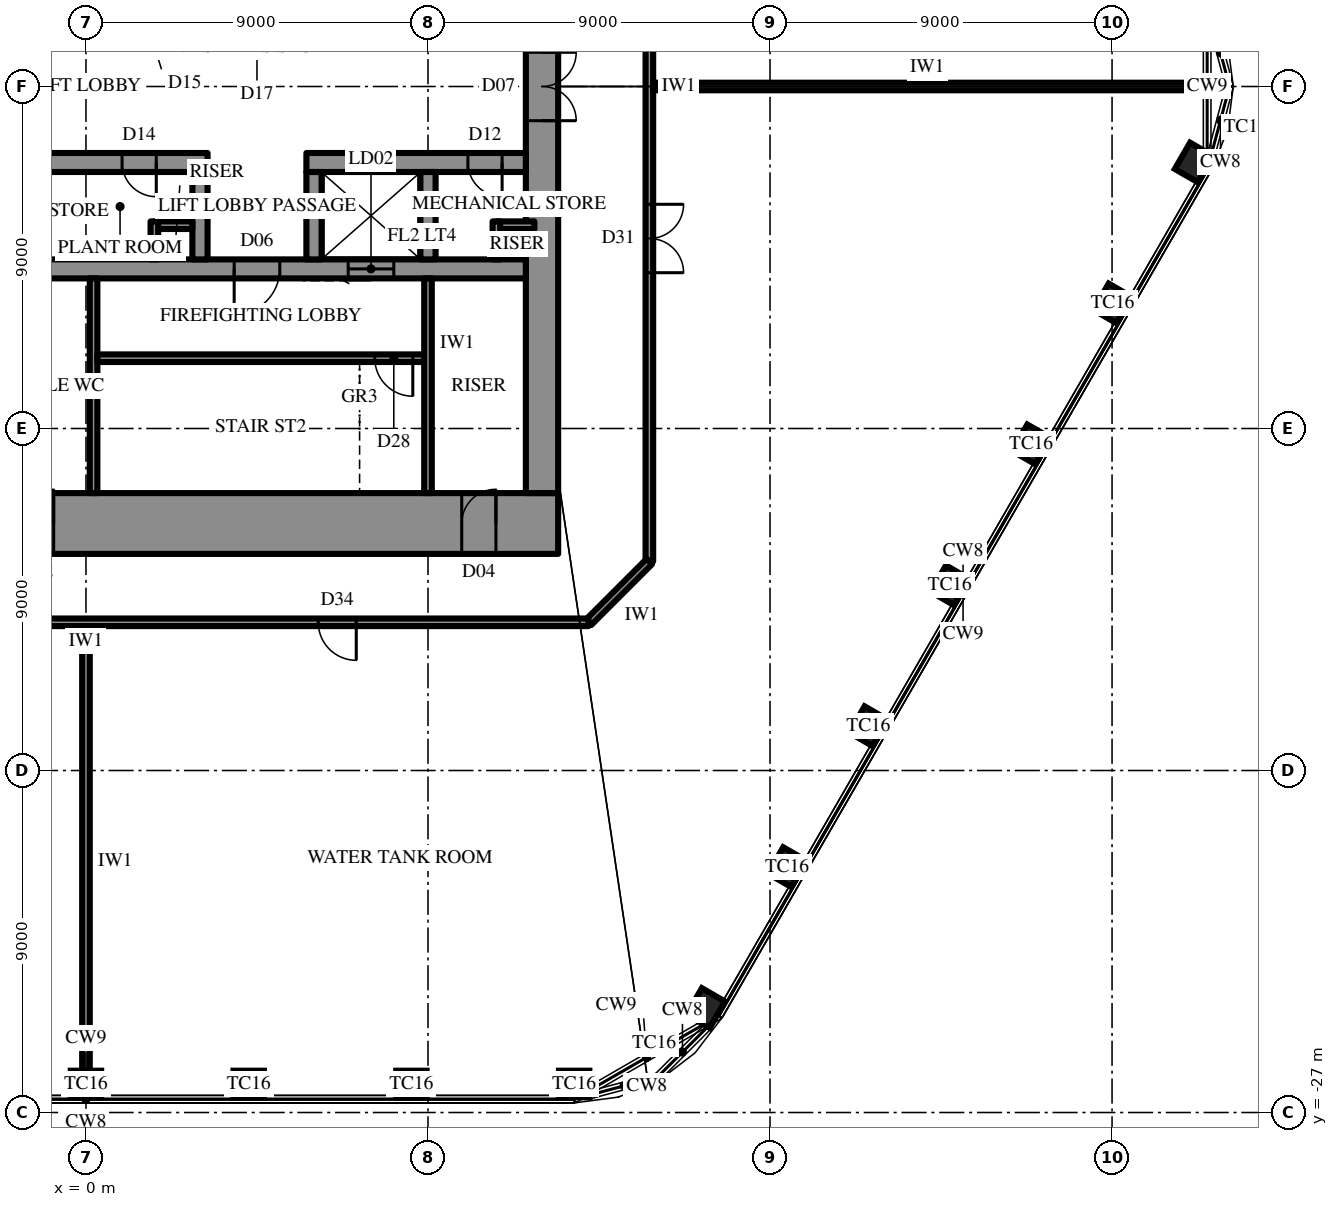
"""IFC4 building model, lengths in metres.
Left out: names, types, materials, properties, quantities, classifications, styles, units other than length and angle.
Written with IfcOpenShell. Run it as: python <this file> out.ifc"""

import sys

from ifc_helpers import new_model, si_unit, direction, frame, frame_2d, origin, origin_2d, place, context, subcontext, project, spatial, rectangle, extrude, element, fill, save


model = new_model("IFC4")
c1 = context("Model", 3, precision=1e-05, world=origin(), true_north=direction((0.0, 1.0)))
c2 = subcontext(c1, "Body", "Model", "MODEL_VIEW")
j1 = project(units=[si_unit("LENGTHUNIT", "METRE"), si_unit("PLANEANGLEUNIT", "RADIAN")], contexts=[c1])
p1 = place(None, origin())
s1 = spatial("IfcSite", under=j1, at=p1, CompositionType="ELEMENT")
p2 = place(p1, origin())
s2 = spatial("IfcBuilding", under=s1, at=p2, CompositionType="ELEMENT")
p3 = place(p2, frame((0.0, 0.0, 402.3)))
s3 = spatial("IfcBuildingStorey", under=s2, at=p3, CompositionType="ELEMENT", Elevation=402.3)
for number, where, z_axis, x_axis in (
    (1, (0.0, -26.25, 0.0), (0.0, 0.0, 1.0), (1.0, 0.0, 0.0)),
    (2, (4.282, -26.25, 0.0), (0.0, 0.0, 1.0), (1.0, 0.0, 0.0)),
    (3, (8.564, -26.25, 0.0), (0.0, 0.0, 1.0), (1.0, 0.0, 0.0)),
    (4, (12.846, -26.25, 0.0), (0.0, 0.0, 1.0), (1.0, 0.0, 0.0)),
    (5, (16.31, -24.25, 0.0), (0.0, 0.0, 1.0), (0.5, 0.866, 0.0)),
    (6, (18.451, -20.542, 0.0), (0.0, 0.0, 1.0), (0.5, 0.866, 0.0)),
    (7, (20.592, -16.833, 0.0), (0.0, 0.0, 1.0), (0.5, 0.866, 0.0)),
    (8, (22.733, -13.125, 0.0), (0.0, 0.0, 1.0), (0.5, 0.866, 0.0)),
    (9, (24.874, -9.417, 0.0), (0.0, 0.0, 1.0), (0.5, 0.866, 0.0)),
    (10, (27.015, -5.708, 0.0), (0.0, 0.0, 1.0), (0.5, 0.866, 0.0)),
    (11, (29.156, -2.0, 0.0), (0.0, 0.0, 1.0), (0.5, 0.866, 0.0)),
):
    element("IfcColumn", number, at=place(p3, frame(where, z_axis=z_axis, x_axis=x_axis)), inside=s3, PredefinedType="COLUMN", context=c2, shape_type="SweptSolid", body=[
        extrude(rectangle(XDim=0.8, YDim=0.7, at=origin_2d()), origin(), (0.0, 0.0, 1.0), 6.0),
    ])
p4 = place(p3, frame((12.425, -11.5, 0.0), z_axis=(0.0, 0.0, 1.0), x_axis=(-1.0, 0.0, 0.0)))
e12 = element("IfcWall", 12, at=p4, inside=s3, PredefinedType="SHEAR", context=c2, shape_type="SweptSolid", body=[
    extrude(rectangle(XDim=24.85, YDim=1.6, at=frame_2d((12.425, 0.0))), origin(), (0.0, 0.0, 1.0), 6.0),
])
p5 = place(p4, frame((13.275, 0.0, 0.0)))
e13 = element("IfcOpeningElement", 13, at=p5, cuts=e12, PredefinedType="OPENING", context=c2, shape_type="SweptSolid", body=[
    extrude(rectangle(XDim=0.9, YDim=2.2, at=frame_2d((0.45, 1.1))), frame((0.0, 0.81, 0.0), z_axis=(0.0, -1.0, 0.0), x_axis=(1.0, 0.0, 0.0)), (0.0, 0.0, 1.0), 1.62),
])
p6 = place(p4, frame((16.275, 0.0, 0.0)))
e14 = element("IfcOpeningElement", 14, at=p6, cuts=e12, PredefinedType="OPENING", context=c2, shape_type="SweptSolid", body=[
    extrude(rectangle(XDim=0.9, YDim=2.2, at=frame_2d((0.45, 1.1))), frame((0.0, 0.81, 0.0), z_axis=(0.0, -1.0, 0.0), x_axis=(1.0, 0.0, 0.0)), (0.0, 0.0, 1.0), 1.62),
])
p7 = place(p4, frame((19.325, 0.0, 0.0)))
e15 = element("IfcOpeningElement", 15, at=p7, cuts=e12, PredefinedType="OPENING", context=c2, shape_type="SweptSolid", body=[
    extrude(rectangle(XDim=1.0, YDim=2.2, at=frame_2d((0.5, 1.1))), frame((0.0, 0.81, 0.0), z_axis=(0.0, -1.0, 0.0), x_axis=(1.0, 0.0, 0.0)), (0.0, 0.0, 1.0), 1.62),
])
p8 = place(p4, frame((1.637, 0.0, 0.0)))
e16 = element("IfcOpeningElement", 16, at=p8, cuts=e12, PredefinedType="OPENING", context=c2, shape_type="SweptSolid", body=[
    extrude(rectangle(XDim=0.9, YDim=2.2, at=frame_2d((0.45, 1.1))), frame((0.0, 0.81, 0.0), z_axis=(0.0, -1.0, 0.0), x_axis=(1.0, 0.0, 0.0)), (0.0, 0.0, 1.0), 1.62),
])
p9 = place(p4, frame((22.312, 0.0, 0.0)))
e17 = element("IfcOpeningElement", 17, at=p9, cuts=e12, PredefinedType="OPENING", context=c2, shape_type="SweptSolid", body=[
    extrude(rectangle(XDim=0.9, YDim=2.2, at=frame_2d((0.45, 1.1))), frame((0.0, 0.81, 0.0), z_axis=(0.0, -1.0, 0.0), x_axis=(1.0, 0.0, 0.0)), (0.0, 0.0, 1.0), 1.62),
])
p10 = place(p3, frame((12.0, -10.7, 0.0), z_axis=(0.0, 0.0, 1.0), x_axis=(0.0, 1.0, 0.0)))
e18 = element("IfcWall", 18, at=p10, inside=s3, PredefinedType="SHEAR", context=c2, shape_type="SweptSolid", body=[
    extrude(rectangle(XDim=21.4, YDim=0.85, at=frame_2d((10.7, 0.0))), origin(), (0.0, 0.0, 1.0), 6.0),
])
p11 = place(p10, frame((9.8, 0.0, 0.0)))
e19 = element("IfcOpeningElement", 19, at=p11, cuts=e18, PredefinedType="OPENING", context=c2, shape_type="SweptSolid", body=[
    extrude(rectangle(XDim=1.8, YDim=2.4, at=frame_2d((0.9, 1.2))), frame((0.0, 0.435, 0.0), z_axis=(0.0, -1.0, 0.0), x_axis=(1.0, 0.0, 0.0)), (0.0, 0.0, 1.0), 0.87),
])
p12 = place(p3, frame((11.575, -2.0, 0.0), z_axis=(0.0, 0.0, 1.0), x_axis=(-1.0, 0.0, 0.0)))
e20 = element("IfcWall", 20, at=p12, inside=s3, PredefinedType="SHEAR", context=c2, shape_type="SweptSolid", body=[
    extrude(rectangle(XDim=5.775, YDim=0.5, at=frame_2d((2.887, 0.0))), origin(), (0.0, 0.0, 1.0), 6.0),
])
p13 = place(p12, frame((0.625, 0.0, 0.0)))
e21 = element("IfcOpeningElement", 21, at=p13, cuts=e20, PredefinedType="OPENING", context=c2, shape_type="SweptSolid", body=[
    extrude(rectangle(XDim=0.9, YDim=2.2, at=frame_2d((0.45, 1.1))), frame((0.0, 0.26, 0.0), z_axis=(0.0, -1.0, 0.0), x_axis=(1.0, 0.0, 0.0)), (0.0, 0.0, 1.0), 0.52),
])
p14 = place(p3, frame((3.2, -2.0, 0.0), z_axis=(0.0, 0.0, 1.0), x_axis=(-1.0, 0.0, 0.0)))
e22 = element("IfcWall", 22, at=p14, inside=s3, PredefinedType="SHEAR", context=c2, shape_type="SweptSolid", body=[
    extrude(rectangle(XDim=14.775, YDim=0.5, at=frame_2d((7.387, 0.0))), origin(), (0.0, 0.0, 1.0), 6.0),
])
p15 = place(p14, frame((1.35, 0.0, 0.0)))
e23 = element("IfcOpeningElement", 23, at=p15, cuts=e22, PredefinedType="OPENING", context=c2, shape_type="SweptSolid", body=[
    extrude(rectangle(XDim=0.9, YDim=2.2, at=frame_2d((0.45, 1.1))), frame((0.0, 0.26, 0.0), z_axis=(0.0, -1.0, 0.0), x_axis=(1.0, 0.0, 0.0)), (0.0, 0.0, 1.0), 0.52),
])
p16 = place(p14, frame((4.25, 0.0, 0.0)))
e24 = element("IfcOpeningElement", 24, at=p16, cuts=e22, PredefinedType="OPENING", context=c2, shape_type="SweptSolid", body=[
    extrude(rectangle(XDim=0.9, YDim=2.2, at=frame_2d((0.45, 1.1))), frame((0.0, 0.26, 0.0), z_axis=(0.0, -1.0, 0.0), x_axis=(1.0, 0.0, 0.0)), (0.0, 0.0, 1.0), 0.52),
])
p17 = place(p14, frame((7.25, 0.0, 0.0)))
e25 = element("IfcOpeningElement", 25, at=p17, cuts=e22, PredefinedType="OPENING", context=c2, shape_type="SweptSolid", body=[
    extrude(rectangle(XDim=0.9, YDim=2.2, at=frame_2d((0.45, 1.1))), frame((0.0, 0.26, 0.0), z_axis=(0.0, -1.0, 0.0), x_axis=(1.0, 0.0, 0.0)), (0.0, 0.0, 1.0), 0.52),
])
p18 = place(p14, frame((10.15, 0.0, 0.0)))
e26 = element("IfcOpeningElement", 26, at=p18, cuts=e22, PredefinedType="OPENING", context=c2, shape_type="SweptSolid", body=[
    extrude(rectangle(XDim=0.9, YDim=2.2, at=frame_2d((0.45, 1.1))), frame((0.0, 0.26, 0.0), z_axis=(0.0, -1.0, 0.0), x_axis=(1.0, 0.0, 0.0)), (0.0, 0.0, 1.0), 0.52),
])
p19 = place(p14, frame((13.25, 0.0, 0.0)))
e27 = element("IfcOpeningElement", 27, at=p19, cuts=e22, PredefinedType="OPENING", context=c2, shape_type="SweptSolid", body=[
    extrude(rectangle(XDim=0.9, YDim=2.2, at=frame_2d((0.45, 1.1))), frame((0.0, 0.26, 0.0), z_axis=(0.0, -1.0, 0.0), x_axis=(1.0, 0.0, 0.0)), (0.0, 0.0, 1.0), 0.52),
])
p20 = place(p3, frame((11.575, -4.8, 0.0), z_axis=(0.0, 0.0, 1.0), x_axis=(-1.0, 0.0, 0.0)))
e28 = element("IfcWall", 28, at=p20, inside=s3, PredefinedType="SHEAR", context=c2, shape_type="SweptSolid", body=[
    extrude(rectangle(XDim=23.15, YDim=0.5, at=frame_2d((11.575, 0.0))), origin(), (0.0, 0.0, 1.0), 6.0),
])
p21 = place(p20, frame((6.475, 0.0, 0.0)))
e29 = element("IfcOpeningElement", 29, at=p21, cuts=e28, PredefinedType="OPENING", context=c2, shape_type="SweptSolid", body=[
    extrude(rectangle(XDim=1.2, YDim=2.2, at=frame_2d((0.6, 1.1))), frame((0.0, 0.26, 0.0), z_axis=(0.0, -1.0, 0.0), x_axis=(1.0, 0.0, 0.0)), (0.0, 0.0, 1.0), 0.52),
])
p22 = place(p20, frame((3.475, 0.0, 0.0)))
e30 = element("IfcOpeningElement", 30, at=p22, cuts=e28, PredefinedType="OPENING", context=c2, shape_type="SweptSolid", body=[
    extrude(rectangle(XDim=1.2, YDim=2.2, at=frame_2d((0.6, 1.1))), frame((0.0, 0.26, 0.0), z_axis=(0.0, -1.0, 0.0), x_axis=(1.0, 0.0, 0.0)), (0.0, 0.0, 1.0), 0.52),
])
for number, where, z_axis, x_axis in (
    (31, (9.0, -2.25, 0.0), (0.0, 0.0, 1.0), (0.0, -1.0, 0.0)),
    (32, (6.0, -2.25, 0.0), (0.0, 0.0, 1.0), (0.0, -1.0, 0.0)),
    (33, (3.0, -2.25, 0.0), (0.0, 0.0, 1.0), (0.0, -1.0, 0.0)),
):
    element("IfcWall", number, at=place(p3, frame(where, z_axis=z_axis, x_axis=x_axis)), inside=s3, PredefinedType="SHEAR", context=c2, shape_type="SweptSolid", body=[
        extrude(rectangle(XDim=2.3, YDim=0.4, at=frame_2d((1.15, 0.0))), origin(), (0.0, 0.0, 1.0), 6.0),
    ])
p23 = place(p3, frame((0.2, -5.05, 0.0), z_axis=(0.0, 0.0, 1.0), x_axis=(0.0, -1.0, 0.0)))
e34 = element("IfcWall", 34, at=p23, inside=s3, PredefinedType="SHEAR", context=c2, shape_type="SweptSolid", body=[
    extrude(rectangle(XDim=5.65, YDim=0.2, at=frame_2d((2.825, 0.0))), origin(), (0.0, 0.0, 1.0), 6.0),
])
p24 = place(p3, frame((8.9, -7.15, 0.0), z_axis=(0.0, 0.0, 1.0), x_axis=(-1.0, 0.0, 0.0)))
e35 = element("IfcWall", 35, at=p24, inside=s3, PredefinedType="SHEAR", context=c2, shape_type="SweptSolid", body=[
    extrude(rectangle(XDim=8.6, YDim=0.2, at=frame_2d((4.3, 0.0))), origin(), (0.0, 0.0, 1.0), 6.0),
])
p25 = place(p24, frame((0.3, 0.0, 0.0)))
e36 = element("IfcOpeningElement", 36, at=p25, cuts=e35, PredefinedType="OPENING", context=c2, shape_type="SweptSolid", body=[
    extrude(rectangle(XDim=1.0, YDim=2.2, at=frame_2d((0.5, 1.1))), frame((0.0, 0.11, 0.0), z_axis=(0.0, -1.0, 0.0), x_axis=(1.0, 0.0, 0.0)), (0.0, 0.0, 1.0), 0.22),
])
p26 = place(p3, frame((9.0, -5.05, 0.0), z_axis=(0.0, 0.0, 1.0), x_axis=(0.0, -1.0, 0.0)))
e37 = element("IfcWall", 37, at=p26, inside=s3, PredefinedType="PARTITIONING", context=c2, shape_type="SweptSolid", body=[
    extrude(rectangle(XDim=5.65, YDim=0.2, at=frame_2d((2.825, 0.0))), origin(), (0.0, 0.0, 1.0), 5.7),
])
for number, where, z_axis, x_axis in (
    (38, (11.8, -3.65, 0.0), (0.0, 0.0, 1.0), (-1.0, 0.0, 0.0)),
    (39, (10.8, -3.55, 0.0), (0.0, 0.0, 1.0), (0.0, -1.0, 0.0)),
    (40, (2.8, -3.65, 0.0), (0.0, 0.0, 1.0), (-1.0, 0.0, 0.0)),
    (41, (1.8, -3.55, 0.0), (0.0, 0.0, 1.0), (0.0, -1.0, 0.0)),
):
    element("IfcWall", number, at=place(p3, frame(where, z_axis=z_axis, x_axis=x_axis)), inside=s3, PredefinedType="PARTITIONING", context=c2, shape_type="SweptSolid", body=[
        extrude(rectangle(XDim=1.0, YDim=0.2, at=frame_2d((0.5, 0.0))), origin(), (0.0, 0.0, 1.0), 5.7),
    ])
p27 = place(p3, frame((14.825, 12.5, 0.0), z_axis=(0.0, 0.0, 1.0), x_axis=(0.0, -1.0, 0.0)))
e42 = element("IfcWall", 42, at=p27, inside=s3, PredefinedType="PARTITIONING", context=c2, shape_type="SweptSolid", body=[
    extrude(rectangle(XDim=25.0, YDim=0.2, at=frame_2d((12.5, 0.0))), origin(), (0.0, 0.0, 1.0), 5.7),
])
p28 = place(p27, frame((7.6, 0.0, 0.0)))
e43 = element("IfcOpeningElement", 43, at=p28, cuts=e42, PredefinedType="OPENING", context=c2, shape_type="SweptSolid", body=[
    extrude(rectangle(XDim=1.8, YDim=2.4, at=frame_2d((0.9, 1.2))), frame((0.0, 0.11, 0.0), z_axis=(0.0, -1.0, 0.0), x_axis=(1.0, 0.0, 0.0)), (0.0, 0.0, 1.0), 0.22),
])
p29 = place(p27, frame((15.6, 0.0, 0.0)))
e44 = element("IfcOpeningElement", 44, at=p29, cuts=e42, PredefinedType="OPENING", context=c2, shape_type="SweptSolid", body=[
    extrude(rectangle(XDim=1.8, YDim=2.4, at=frame_2d((0.9, 1.2))), frame((0.0, 0.11, 0.0), z_axis=(0.0, -1.0, 0.0), x_axis=(1.0, 0.0, 0.0)), (0.0, 0.0, 1.0), 0.22),
])
p30 = place(p3, frame((14.825, -12.5, 0.0), z_axis=(0.0, 0.0, 1.0), x_axis=(-0.707052830339, -0.707160727918, 0.0)))
e45 = element("IfcWall", 45, at=p30, inside=s3, PredefinedType="PARTITIONING", context=c2, shape_type="SweptSolid", body=[
    extrude(rectangle(XDim=2.263, YDim=0.2, at=frame_2d((1.131, 0.0))), origin(), (0.0, 0.0, 1.0), 5.7),
])
p31 = place(p3, frame((13.225, -14.1, 0.0), z_axis=(0.0, 0.0, 1.0), x_axis=(-1.0, 0.0, 0.0)))
e46 = element("IfcWall", 46, at=p31, inside=s3, PredefinedType="PARTITIONING", context=c2, shape_type="SweptSolid", body=[
    extrude(rectangle(XDim=26.45, YDim=0.2, at=frame_2d((13.225, 0.0))), origin(), (0.0, 0.0, 1.0), 5.7),
])
p32 = place(p31, frame((6.113, 0.0, 0.0)))
e47 = element("IfcOpeningElement", 47, at=p32, cuts=e46, PredefinedType="OPENING", context=c2, shape_type="SweptSolid", body=[
    extrude(rectangle(XDim=1.0, YDim=2.2, at=frame_2d((0.5, 1.1))), frame((0.0, 0.11, 0.0), z_axis=(0.0, -1.0, 0.0), x_axis=(1.0, 0.0, 0.0)), (0.0, 0.0, 1.0), 0.22),
])
p33 = place(p3, frame((0.0, -14.2, 0.0), z_axis=(0.0, 0.0, 1.0), x_axis=(0.0, -1.0, 0.0)))
e48 = element("IfcWall", 48, at=p33, inside=s3, PredefinedType="PARTITIONING", context=c2, shape_type="SweptSolid", body=[
    extrude(rectangle(XDim=12.36, YDim=0.2, at=frame_2d((6.18, 0.0))), origin(), (0.0, 0.0, 1.0), 4.692),
])
p34 = place(p3, frame((14.925, 0.0, 0.0), z_axis=(0.0, 0.0, 1.0), x_axis=(1.0, 0.0, 0.0)))
e49 = element("IfcWall", 49, at=p34, inside=s3, PredefinedType="PARTITIONING", context=c2, shape_type="SweptSolid", body=[
    extrude(rectangle(XDim=14.422, YDim=0.2, at=frame_2d((7.211, 0.0))), origin(), (0.0, 0.0, 1.0), 4.664),
])
p35 = place(p3, frame((29.347, 0.0, 0.0), z_axis=(0.0, 0.0, 1.0), x_axis=(1.0, 0.0, 0.0)))
e50 = element("IfcWall", 50, at=p35, inside=s3, PredefinedType="PARTITIONING", context=c2, shape_type="SweptSolid", body=[
    extrude(rectangle(XDim=0.657, YDim=0.2, at=frame_2d((0.328, 0.0))), origin(), (0.0, 0.0, 1.0), 5.7),
])
p36 = place(p11, frame((1.8, 0.0, 0.0), z_axis=(0.0, 0.0, 1.0), x_axis=(-1.0, 0.0, 0.0)))
e51 = element("IfcDoor", 51, at=p36, inside=s3, OperationType="DOUBLE_DOOR_SINGLE_SWING", PredefinedType="DOOR", context=c2, shape_type="SweptSolid", body=[
    extrude(rectangle(XDim=1.8, YDim=2.4, at=frame_2d((0.9, 1.2))), frame((0.0, 0.025, 0.0), z_axis=(0.0, -1.0, 0.0), x_axis=(1.0, 0.0, 0.0)), (0.0, 0.0, 1.0), 0.05),
])
fill(e19, e51)
p37 = place(p21, origin())
e52 = element("IfcDoor", 52, at=p37, inside=s3, OperationType="SINGLE_SWING_LEFT", PredefinedType="DOOR", context=c2, shape_type="SweptSolid", body=[
    extrude(rectangle(XDim=1.2, YDim=2.2, at=frame_2d((0.6, 1.1))), frame((0.0, 0.025, 0.0), z_axis=(0.0, -1.0, 0.0), x_axis=(1.0, 0.0, 0.0)), (0.0, 0.0, 1.0), 0.05),
])
fill(e29, e52)
p38 = place(p25, origin())
e53 = element("IfcDoor", 53, at=p38, inside=s3, OperationType="SINGLE_SWING_RIGHT", PredefinedType="DOOR", context=c2, shape_type="SweptSolid", body=[
    extrude(rectangle(XDim=1.0, YDim=2.2, at=frame_2d((0.5, 1.1))), frame((0.0, 0.025, 0.0), z_axis=(0.0, -1.0, 0.0), x_axis=(1.0, 0.0, 0.0)), (0.0, 0.0, 1.0), 0.05),
])
fill(e36, e53)
p39 = place(p5, frame((0.9, 0.0, 0.0), z_axis=(0.0, 0.0, 1.0), x_axis=(-1.0, 0.0, 0.0)))
e54 = element("IfcDoor", 54, at=p39, inside=s3, OperationType="SINGLE_SWING_LEFT", PredefinedType="DOOR", context=c2, shape_type="SweptSolid", body=[
    extrude(rectangle(XDim=0.9, YDim=2.2, at=frame_2d((0.45, 1.1))), frame((0.0, 0.025, 0.0), z_axis=(0.0, -1.0, 0.0), x_axis=(1.0, 0.0, 0.0)), (0.0, 0.0, 1.0), 0.05),
])
fill(e13, e54)
p40 = place(p8, frame((0.9, 0.0, 0.0), z_axis=(0.0, 0.0, 1.0), x_axis=(-1.0, 0.0, 0.0)))
e55 = element("IfcDoor", 55, at=p40, inside=s3, OperationType="SINGLE_SWING_LEFT", PredefinedType="DOOR", context=c2, shape_type="SweptSolid", body=[
    extrude(rectangle(XDim=0.9, YDim=2.2, at=frame_2d((0.45, 1.1))), frame((0.0, 0.025, 0.0), z_axis=(0.0, -1.0, 0.0), x_axis=(1.0, 0.0, 0.0)), (0.0, 0.0, 1.0), 0.05),
])
fill(e16, e55)
p41 = place(p13, origin())
e56 = element("IfcDoor", 56, at=p41, inside=s3, OperationType="SINGLE_SWING_RIGHT", PredefinedType="DOOR", context=c2, shape_type="SweptSolid", body=[
    extrude(rectangle(XDim=0.9, YDim=2.2, at=frame_2d((0.45, 1.1))), frame((0.0, 0.025, 0.0), z_axis=(0.0, -1.0, 0.0), x_axis=(1.0, 0.0, 0.0)), (0.0, 0.0, 1.0), 0.05),
])
fill(e21, e56)
p42 = place(p15, origin())
e57 = element("IfcDoor", 57, at=p42, inside=s3, OperationType="SINGLE_SWING_RIGHT", PredefinedType="DOOR", context=c2, shape_type="SweptSolid", body=[
    extrude(rectangle(XDim=0.9, YDim=2.2, at=frame_2d((0.45, 1.1))), frame((0.0, 0.025, 0.0), z_axis=(0.0, -1.0, 0.0), x_axis=(1.0, 0.0, 0.0)), (0.0, 0.0, 1.0), 0.05),
])
fill(e23, e57)
p43 = place(p22, origin())
e58 = element("IfcDoor", 58, at=p43, inside=s3, OperationType="SLIDING_TO_LEFT", PredefinedType="DOOR", context=c2, shape_type="SweptSolid", body=[
    extrude(rectangle(XDim=1.2, YDim=2.2, at=frame_2d((0.6, 1.1))), frame((0.0, 0.025, 0.0), z_axis=(0.0, -1.0, 0.0), x_axis=(1.0, 0.0, 0.0)), (0.0, 0.0, 1.0), 0.05),
])
fill(e30, e58)
p44 = place(p32, origin())
e59 = element("IfcDoor", 59, at=p44, inside=s3, OperationType="SINGLE_SWING_RIGHT", PredefinedType="DOOR", context=c2, shape_type="SweptSolid", body=[
    extrude(rectangle(XDim=1.0, YDim=2.2, at=frame_2d((0.5, 1.1))), frame((0.0, 0.025, 0.0), z_axis=(0.0, -1.0, 0.0), x_axis=(1.0, 0.0, 0.0)), (0.0, 0.0, 1.0), 0.05),
])
fill(e47, e59)
p45 = place(p29, origin())
e60 = element("IfcDoor", 60, at=p45, inside=s3, OperationType="DOUBLE_DOOR_SINGLE_SWING", PredefinedType="DOOR", context=c2, shape_type="SweptSolid", body=[
    extrude(rectangle(XDim=1.8, YDim=2.4, at=frame_2d((0.9, 1.2))), frame((0.0, 0.025, 0.0), z_axis=(0.0, -1.0, 0.0), x_axis=(1.0, 0.0, 0.0)), (0.0, 0.0, 1.0), 0.05),
])
fill(e44, e60)
save(model, sys.argv[1])
